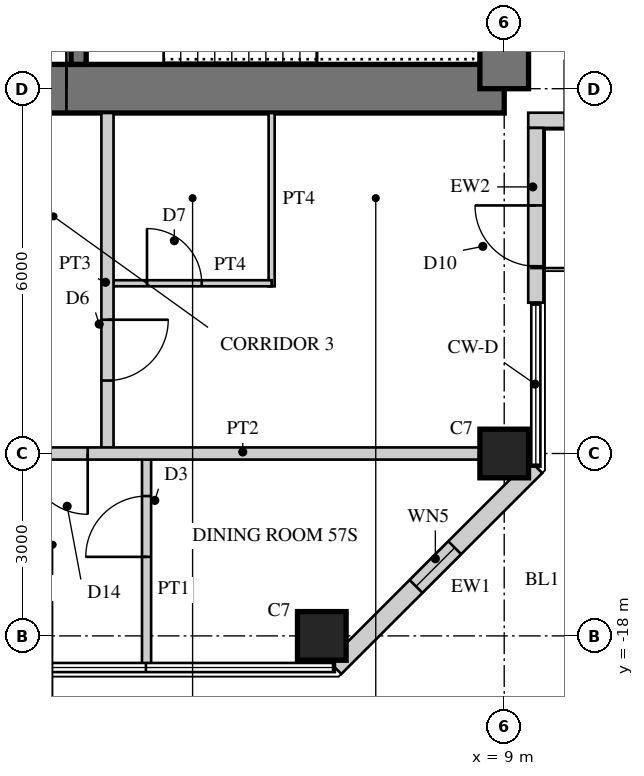
"""IFC4 building model, lengths in metres.
Left out: names, types, materials, properties, quantities, classifications, styles, units other than length and angle.
Written with IfcOpenShell. Run it as: python <this file> out.ifc"""

import sys

from ifc_helpers import new_model, si_unit, direction, frame, frame_2d, origin, origin_2d, place, context, subcontext, project, spatial, rectangle, hollow_rectangle, extrude, element, fill, save


model = new_model("IFC4")
c1 = context("Model", 3, precision=1e-05, world=origin(), true_north=direction((0.0, 1.0)))
c2 = subcontext(c1, "Body", "Model", "MODEL_VIEW")
j1 = project(units=[si_unit("LENGTHUNIT", "METRE"), si_unit("PLANEANGLEUNIT", "RADIAN")], contexts=[c1])
p1 = place(None, origin())
s1 = spatial("IfcSite", under=j1, at=p1, CompositionType="ELEMENT")
p2 = place(p1, origin())
s2 = spatial("IfcBuilding", under=s1, at=p2, CompositionType="ELEMENT")
p3 = place(p2, frame((0.0, 0.0, 225.5)))
s3 = spatial("IfcBuildingStorey", under=s2, at=p3, CompositionType="ELEMENT", Elevation=225.5)
p4 = place(p3, frame((-9.0, -9.0, 0.0), z_axis=(0.0, 0.0, 1.0), x_axis=(1.0, 0.0, 0.0)))
e1 = element("IfcWall", 1, at=p4, inside=s3, PredefinedType="SHEAR", context=c2, shape_type="SweptSolid", body=[
    extrude(rectangle(XDim=18.0, YDim=0.8, at=frame_2d((9.0, 0.0))), origin(), (0.0, 0.0, 1.0), 3.4),
])
p5 = place(p4, frame((9.8, 0.0, 0.0)))
e2 = element("IfcOpeningElement", 2, at=p5, cuts=e1, PredefinedType="OPENING", context=c2, shape_type="SweptSolid", body=[
    extrude(rectangle(XDim=1.0, YDim=2.4, at=frame_2d((0.5, 1.2))), frame((0.0, 0.41, 0.0), z_axis=(0.0, -1.0, 0.0), x_axis=(1.0, 0.0, 0.0)), (0.0, 0.0, 1.0), 0.82),
])
p6 = place(p3, frame((9.0, -9.0, 0.0), z_axis=(0.0, 0.0, 1.0), x_axis=(0.0, 1.0, 0.0)))
e3 = element("IfcWall", 3, at=p6, inside=s3, PredefinedType="SHEAR", context=c2, shape_type="SweptSolid", body=[
    extrude(rectangle(XDim=18.0, YDim=0.8, at=frame_2d((9.0, 0.0))), origin(), (0.0, 0.0, 1.0), 3.4),
])
p7 = place(p6, frame((9.8, 0.0, 0.0)))
e4 = element("IfcOpeningElement", 4, at=p7, cuts=e3, PredefinedType="OPENING", context=c2, shape_type="SweptSolid", body=[
    extrude(rectangle(XDim=1.0, YDim=2.4, at=frame_2d((0.5, 1.2))), frame((0.0, 0.41, 0.0), z_axis=(0.0, -1.0, 0.0), x_axis=(1.0, 0.0, 0.0)), (0.0, 0.0, 1.0), 0.82),
])
p8 = place(p3, frame((2.0, -1.675, 0.0), z_axis=(0.0, 0.0, 1.0), x_axis=(0.0, -1.0, 0.0)))
e5 = element("IfcWall", 5, at=p8, inside=s3, PredefinedType="SHEAR", context=c2, shape_type="SweptSolid", body=[
    extrude(rectangle(XDim=6.925, YDim=0.25, at=frame_2d((3.462, 0.0))), origin(), (0.0, 0.0, 1.0), 3.4),
])
p9 = place(p8, frame((0.725, 0.0, 0.0)))
e6 = element("IfcOpeningElement", 6, at=p9, cuts=e5, PredefinedType="OPENING", context=c2, shape_type="SweptSolid", body=[
    extrude(rectangle(XDim=1.0, YDim=2.1, at=frame_2d((0.5, 1.05))), frame((0.0, 0.135, 0.0), z_axis=(0.0, -1.0, 0.0), x_axis=(1.0, 0.0, 0.0)), (0.0, 0.0, 1.0), 0.27),
])
for number, where, z_axis, x_axis in (
    (7, (9.0, -15.0, 0.0), (0.0, 0.0, 1.0), (1.0, 0.0, 0.0)),
    (8, (6.0, -18.0, 0.0), (0.0, 0.0, 1.0), (1.0, 0.0, 0.0)),
):
    element("IfcColumn", number, at=place(p3, frame(where, z_axis=z_axis, x_axis=x_axis)), inside=s3, PredefinedType="COLUMN", context=c2, shape_type="SweptSolid", body=[
        extrude(rectangle(XDim=0.8, YDim=0.8, at=origin_2d()), origin(), (0.0, 0.0, 1.0), 3.4),
    ])
p10 = place(p3, frame((9.395, -9.52, 0.0), z_axis=(0.0, 0.0, 1.0), x_axis=(1.0, 0.0, 0.0)))
e9 = element("IfcWall", 9, at=p10, inside=s3, PredefinedType="SOLIDWALL", context=c2, shape_type="SweptSolid", body=[
    extrude(rectangle(XDim=3.125, YDim=0.25, at=frame_2d((1.562, 0.0))), origin(), (0.0, 0.0, 1.0), 3.22),
])
p11 = place(p10, frame((0.6, 0.0, 0.0)))
e10 = element("IfcOpeningElement", 10, at=p11, cuts=e9, PredefinedType="OPENING", context=c2, shape_type="SweptSolid", body=[
    extrude(rectangle(XDim=1.0, YDim=2.2, at=frame_2d((0.5, 1.1))), frame((0.0, 0.135, 0.0), z_axis=(0.0, -1.0, 0.0), x_axis=(1.0, 0.0, 0.0)), (0.0, 0.0, 1.0), 0.27),
])
p12 = place(p3, frame((6.215, -18.52, 0.0), z_axis=(0.0, 0.0, 1.0), x_axis=(0.707106781187, 0.707106781187, 0.0)))
e11 = element("IfcWall", 11, at=p12, inside=s3, PredefinedType="SOLIDWALL", context=c2, shape_type="SweptSolid", body=[
    extrude(rectangle(XDim=4.674, YDim=0.3, at=frame_2d((2.337, 0.0))), origin(), (0.0, 0.0, 1.0), 3.22),
])
p13 = place(p12, frame((1.887, 0.0, 0.3)))
e12 = element("IfcOpeningElement", 12, at=p13, cuts=e11, PredefinedType="OPENING", context=c2, shape_type="SweptSolid", body=[
    extrude(rectangle(XDim=0.9, YDim=2.4, at=frame_2d((0.45, 1.2))), frame((0.0, 0.16, 0.0), z_axis=(0.0, -1.0, 0.0), x_axis=(1.0, 0.0, 0.0)), (0.0, 0.0, 1.0), 0.32),
])
p14 = place(p3, frame((9.52, -12.52, 0.0), z_axis=(0.0, 0.0, 1.0), x_axis=(0.0, 1.0, 0.0)))
e13 = element("IfcWall", 13, at=p14, inside=s3, PredefinedType="SOLIDWALL", context=c2, shape_type="SweptSolid", body=[
    extrude(rectangle(XDim=2.875, YDim=0.25, at=frame_2d((1.438, 0.0))), origin(), (0.0, 0.0, 1.0), 3.22),
])
p15 = place(p14, frame((0.6, 0.0, 0.0)))
e14 = element("IfcOpeningElement", 14, at=p15, cuts=e13, PredefinedType="OPENING", context=c2, shape_type="SweptSolid", body=[
    extrude(rectangle(XDim=1.0, YDim=2.2, at=frame_2d((0.5, 1.1))), frame((0.0, 0.135, 0.0), z_axis=(0.0, -1.0, 0.0), x_axis=(1.0, 0.0, 0.0)), (0.0, 0.0, 1.0), 0.27),
])
p16 = place(p3, frame((5.175, -9.4, 0.0), z_axis=(0.0, 0.0, 1.0), x_axis=(0.0, -1.0, 0.0)))
e15 = element("IfcWall", 15, at=p16, inside=s3, PredefinedType="PARTITIONING", context=c2, shape_type="SweptSolid", body=[
    extrude(rectangle(XDim=2.85, YDim=0.1, at=frame_2d((1.425, 0.0))), origin(), (0.0, 0.0, 1.0), 3.22),
])
p17 = place(p3, frame((2.575, -12.2, 0.0), z_axis=(0.0, 0.0, 1.0), x_axis=(1.0, 0.0, 0.0)))
e16 = element("IfcWall", 16, at=p17, inside=s3, PredefinedType="PARTITIONING", context=c2, shape_type="SweptSolid", body=[
    extrude(rectangle(XDim=2.6, YDim=0.1, at=frame_2d((1.3, 0.0))), origin(), (0.0, 0.0, 1.0), 3.22),
])
p18 = place(p17, frame((0.55, 0.0, 0.0)))
e17 = element("IfcOpeningElement", 17, at=p18, cuts=e16, PredefinedType="OPENING", context=c2, shape_type="SweptSolid", body=[
    extrude(rectangle(XDim=0.9, YDim=2.1, at=frame_2d((0.45, 1.05))), frame((0.0, 0.06, 0.0), z_axis=(0.0, -1.0, 0.0), x_axis=(1.0, 0.0, 0.0)), (0.0, 0.0, 1.0), 0.12),
])
p19 = place(p3, frame((2.475, -9.4, 0.0), z_axis=(0.0, 0.0, 1.0), x_axis=(0.0, -1.0, 0.0)))
e18 = element("IfcWall", 18, at=p19, inside=s3, PredefinedType="SOLIDWALL", context=c2, shape_type="SweptSolid", body=[
    extrude(rectangle(XDim=5.6, YDim=0.2, at=frame_2d((2.8, 0.0))), origin(), (0.0, 0.0, 1.0), 3.22),
])
p20 = place(p19, frame((3.4, 0.0, 0.0)))
e19 = element("IfcOpeningElement", 19, at=p20, cuts=e18, PredefinedType="OPENING", context=c2, shape_type="SweptSolid", body=[
    extrude(rectangle(XDim=1.0, YDim=2.15, at=frame_2d((0.5, 1.075))), frame((0.0, 0.11, 0.0), z_axis=(0.0, -1.0, 0.0), x_axis=(1.0, 0.0, 0.0)), (0.0, 0.0, 1.0), 0.22),
])
p21 = place(p3, frame((3.118, -15.1, 0.0), z_axis=(0.0, 0.0, 1.0), x_axis=(0.0, -1.0, 0.0)))
e20 = element("IfcWall", 20, at=p21, inside=s3, PredefinedType="PARTITIONING", context=c2, shape_type="SweptSolid", body=[
    extrude(rectangle(XDim=3.38, YDim=0.15, at=frame_2d((1.69, 0.0))), origin(), (0.0, 0.0, 1.0), 3.22),
])
p22 = place(p21, frame((0.6, 0.0, 0.0)))
e21 = element("IfcOpeningElement", 21, at=p22, cuts=e20, PredefinedType="OPENING", context=c2, shape_type="SweptSolid", body=[
    extrude(rectangle(XDim=1.0, YDim=2.1, at=frame_2d((0.5, 1.05))), frame((0.0, 0.085, 0.0), z_axis=(0.0, -1.0, 0.0), x_axis=(1.0, 0.0, 0.0)), (0.0, 0.0, 1.0), 0.17),
])
p23 = place(p3, frame((0.8, -15.0, 0.0), z_axis=(0.0, 0.0, 1.0), x_axis=(1.0, 0.0, 0.0)))
e22 = element("IfcWall", 22, at=p23, inside=s3, PredefinedType="SOLIDWALL", context=c2, shape_type="SweptSolid", body=[
    extrude(rectangle(XDim=7.8, YDim=0.2, at=frame_2d((3.9, 0.0))), origin(), (0.0, 0.0, 1.0), 2.52),
])
p24 = place(p23, frame((0.35, 0.0, 0.0)))
e23 = element("IfcOpeningElement", 23, at=p24, cuts=e22, PredefinedType="OPENING", context=c2, shape_type="SweptSolid", body=[
    extrude(rectangle(XDim=1.0, YDim=2.2, at=frame_2d((0.5, 1.1))), frame((0.0, 0.11, 0.0), z_axis=(0.0, -1.0, 0.0), x_axis=(1.0, 0.0, 0.0)), (0.0, 0.0, 1.0), 0.22),
])
p25 = place(p11, origin())
e24 = element("IfcDoor", 24, at=p25, inside=s3, OperationType="SINGLE_SWING_LEFT", PredefinedType="DOOR", context=c2, shape_type="SweptSolid", body=[
    extrude(hollow_rectangle(XDim=1.0, YDim=2.2, WallThickness=0.06, at=frame_2d((0.5, 1.1))), frame((0.0, 0.025, 0.0), z_axis=(0.0, -1.0, 0.0), x_axis=(1.0, 0.0, 0.0)), (0.0, 0.0, 1.0), 0.05),
    extrude(rectangle(XDim=0.879, YDim=2.079, at=frame_2d((0.5, 1.1))), frame((0.0, 0.025, 0.0), z_axis=(0.0, -1.0, 0.0), x_axis=(1.0, 0.0, 0.0)), (0.0, 0.0, 1.0), 0.05),
])
fill(e10, e24)
p26 = place(p13, origin())
e25 = element("IfcWindow", 25, at=p26, inside=s3, PartitioningType="SINGLE_PANEL", PredefinedType="WINDOW", context=c2, shape_type="SweptSolid", body=[
    extrude(hollow_rectangle(XDim=0.9, YDim=2.4, WallThickness=0.06, at=frame_2d((0.45, 1.2))), frame((0.0, 0.03, 0.0), z_axis=(0.0, -1.0, 0.0), x_axis=(1.0, 0.0, 0.0)), (0.0, 0.0, 1.0), 0.06),
    extrude(rectangle(XDim=0.779, YDim=2.279, at=frame_2d((0.45, 1.2))), frame((0.0, 0.03, 0.0), z_axis=(0.0, -1.0, 0.0), x_axis=(1.0, 0.0, 0.0)), (0.0, 0.0, 1.0), 0.06),
])
fill(e12, e25)
p27 = place(p15, origin())
e26 = element("IfcDoor", 26, at=p27, inside=s3, OperationType="SINGLE_SWING_RIGHT", PredefinedType="DOOR", context=c2, shape_type="SweptSolid", body=[
    extrude(hollow_rectangle(XDim=1.0, YDim=2.2, WallThickness=0.06, at=frame_2d((0.5, 1.1))), frame((0.0, 0.025, 0.0), z_axis=(0.0, -1.0, 0.0), x_axis=(1.0, 0.0, 0.0)), (0.0, 0.0, 1.0), 0.05),
    extrude(rectangle(XDim=0.879, YDim=2.079, at=frame_2d((0.5, 1.1))), frame((0.0, 0.025, 0.0), z_axis=(0.0, -1.0, 0.0), x_axis=(1.0, 0.0, 0.0)), (0.0, 0.0, 1.0), 0.05),
])
fill(e14, e26)
p28 = place(p18, origin())
e27 = element("IfcDoor", 27, at=p28, inside=s3, OperationType="SINGLE_SWING_LEFT", PredefinedType="DOOR", context=c2, shape_type="SweptSolid", body=[
    extrude(rectangle(XDim=0.9, YDim=2.1, at=frame_2d((0.45, 1.05))), frame((0.0, 0.025, 0.0), z_axis=(0.0, -1.0, 0.0), x_axis=(1.0, 0.0, 0.0)), (0.0, 0.0, 1.0), 0.05),
])
fill(e17, e27)
p29 = place(p20, origin())
e28 = element("IfcDoor", 28, at=p29, inside=s3, OperationType="SINGLE_SWING_LEFT", PredefinedType="DOOR", context=c2, shape_type="SweptSolid", body=[
    extrude(rectangle(XDim=1.0, YDim=2.15, at=frame_2d((0.5, 1.075))), frame((0.0, 0.025, 0.0), z_axis=(0.0, -1.0, 0.0), x_axis=(1.0, 0.0, 0.0)), (0.0, 0.0, 1.0), 0.05),
])
fill(e19, e28)
p30 = place(p22, frame((1.0, 0.0, 0.0), z_axis=(0.0, 0.0, 1.0), x_axis=(-1.0, 0.0, 0.0)))
e29 = element("IfcDoor", 29, at=p30, inside=s3, OperationType="SINGLE_SWING_LEFT", PredefinedType="DOOR", context=c2, shape_type="SweptSolid", body=[
    extrude(rectangle(XDim=1.0, YDim=2.1, at=frame_2d((0.5, 1.05))), frame((0.0, 0.025, 0.0), z_axis=(0.0, -1.0, 0.0), x_axis=(1.0, 0.0, 0.0)), (0.0, 0.0, 1.0), 0.05),
])
fill(e21, e29)
p31 = place(p24, frame((1.0, 0.0, 0.0), z_axis=(0.0, 0.0, 1.0), x_axis=(-1.0, 0.0, 0.0)))
e30 = element("IfcDoor", 30, at=p31, inside=s3, OperationType="SINGLE_SWING_LEFT", PredefinedType="DOOR", context=c2, shape_type="SweptSolid", body=[
    extrude(rectangle(XDim=1.0, YDim=2.2, at=frame_2d((0.5, 1.1))), frame((0.0, 0.025, 0.0), z_axis=(0.0, -1.0, 0.0), x_axis=(1.0, 0.0, 0.0)), (0.0, 0.0, 1.0), 0.05),
])
fill(e23, e30)
p32 = place(p5, origin())
e31 = element("IfcDoor", 31, at=p32, inside=s3, OperationType="SINGLE_SWING_RIGHT", PredefinedType="DOOR", context=c2, shape_type="SweptSolid", body=[
    extrude(rectangle(XDim=1.0, YDim=2.4, at=frame_2d((0.5, 1.2))), frame((0.0, 0.055, 0.0), z_axis=(0.0, -1.0, 0.0), x_axis=(1.0, 0.0, 0.0)), (0.0, 0.0, 1.0), 0.05),
])
fill(e2, e31)
save(model, sys.argv[1])
